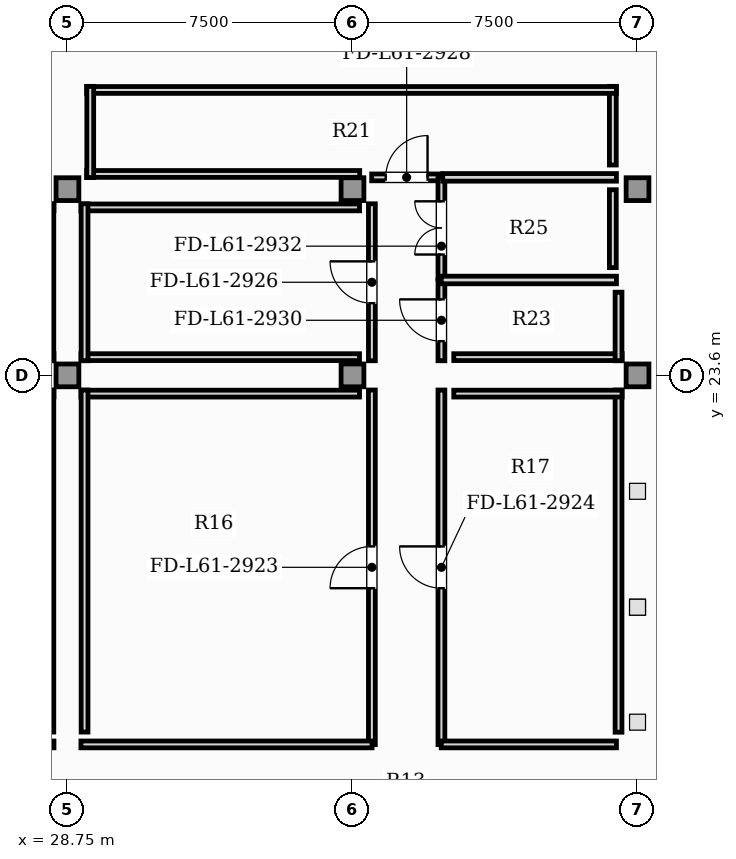
"""IFC4 building model, lengths in metres.
Left out: names, types, materials, properties, quantities, classifications, styles, units other than length and angle.
Written with IfcOpenShell. Run it as: python <this file> out.ifc"""

import sys

from ifc_helpers import new_model, si_unit, direction, frame, frame_2d, origin, origin_2d, place, context, subcontext, project, spatial, rectangle, extrude, element, fill, save


model = new_model("IFC4")
c1 = context("Model", 3, precision=1e-05, world=origin(), true_north=direction((0.0, 1.0)))
c2 = subcontext(c1, "Body", "Model", "MODEL_VIEW")
j1 = project(units=[si_unit("LENGTHUNIT", "METRE"), si_unit("PLANEANGLEUNIT", "RADIAN")], contexts=[c1])
p1 = place(None, origin())
s1 = spatial("IfcSite", under=j1, at=p1, CompositionType="ELEMENT")
p2 = place(p1, origin())
s2 = spatial("IfcBuilding", under=s1, at=p2, CompositionType="ELEMENT")
p3 = place(p2, frame((0.0, 0.0, 246.5)))
s3 = spatial("IfcBuildingStorey", under=s2, at=p3, CompositionType="ELEMENT", Elevation=246.5)
for number, where, z_axis, x_axis in (
    (1, (28.75, 23.6, 0.0), (0.0, 0.0, 1.0), (1.0, 0.0, 0.0)),
    (2, (36.25, 23.6, 0.0), (0.0, 0.0, 1.0), (1.0, 0.0, 0.0)),
    (3, (43.75, 23.6, 0.0), (0.0, 0.0, 1.0), (1.0, 0.0, 0.0)),
    (4, (28.75, 28.5, 0.0), (0.0, 0.0, 1.0), (1.0, 0.0, 0.0)),
    (5, (36.25, 28.5, 0.0), (0.0, 0.0, 1.0), (1.0, 0.0, 0.0)),
    (6, (43.75, 28.5, 0.0), (0.0, 0.0, 1.0), (1.0, 0.0, 0.0)),
):
    element("IfcColumn", number, at=place(p3, frame(where, z_axis=z_axis, x_axis=x_axis)), inside=s3, PredefinedType="COLUMN", context=c2, shape_type="SweptSolid", body=[
        extrude(rectangle(XDim=0.6, YDim=0.6, at=origin_2d()), origin(), (0.0, 0.0, 1.0), 5.2),
    ])
p4 = place(p3, frame((21.605, 13.89, 0.0), z_axis=(0.0, 0.0, 1.0), x_axis=(1.0, 0.0, 0.0)))
e7 = element("IfcWall", 7, at=p4, inside=s3, PredefinedType="PARTITIONING", context=c2, shape_type="SweptSolid", body=[
    extrude(rectangle(XDim=6.79, YDim=0.18, at=frame_2d((3.395, 0.0))), origin(), (0.0, 0.0, 1.0), 4.92),
])
p5 = place(p4, frame((2.845, 0.0, 0.0)))
e8 = element("IfcOpeningElement", 8, at=p5, cuts=e7, PredefinedType="OPENING", context=c2, shape_type="SweptSolid", body=[
    extrude(rectangle(XDim=1.1, YDim=2.2, at=frame_2d((0.55, 1.1))), frame((0.0, 0.1, 0.0), z_axis=(0.0, -1.0, 0.0), x_axis=(1.0, 0.0, 0.0)), (0.0, 0.0, 1.0), 0.2),
])
p6 = place(p3, frame((36.76, 13.885, 0.0), z_axis=(0.0, 0.0, 1.0), x_axis=(0.0, 1.0, 0.0)))
e9 = element("IfcWall", 9, at=p6, inside=s3, PredefinedType="PARTITIONING", context=c2, shape_type="SweptSolid", body=[
    extrude(rectangle(XDim=9.33, YDim=0.18, at=frame_2d((4.665, 0.0))), origin(), (0.0, 0.0, 1.0), 4.92),
])
p7 = place(p6, frame((4.115, 0.0, 0.0)))
e10 = element("IfcOpeningElement", 10, at=p7, cuts=e9, PredefinedType="OPENING", context=c2, shape_type="SweptSolid", body=[
    extrude(rectangle(XDim=1.1, YDim=2.2, at=frame_2d((0.55, 1.1))), frame((0.0, 0.1, 0.0), z_axis=(0.0, -1.0, 0.0), x_axis=(1.0, 0.0, 0.0)), (0.0, 0.0, 1.0), 0.2),
])
p8 = place(p3, frame((29.105, 13.89, 0.0), z_axis=(0.0, 0.0, 1.0), x_axis=(1.0, 0.0, 0.0)))
e11 = element("IfcWall", 11, at=p8, inside=s3, PredefinedType="PARTITIONING", context=c2, shape_type="SweptSolid", body=[
    extrude(rectangle(XDim=7.66, YDim=0.18, at=frame_2d((3.83, 0.0))), origin(), (0.0, 0.0, 1.0), 4.92),
])
p9 = place(p3, frame((38.59, 13.885, 0.0), z_axis=(0.0, 0.0, 1.0), x_axis=(0.0, 1.0, 0.0)))
e12 = element("IfcWall", 12, at=p9, inside=s3, PredefinedType="PARTITIONING", context=c2, shape_type="SweptSolid", body=[
    extrude(rectangle(XDim=9.33, YDim=0.18, at=frame_2d((4.665, 0.0))), origin(), (0.0, 0.0, 1.0), 4.92),
])
p10 = place(p9, frame((4.115, 0.0, 0.0)))
e13 = element("IfcOpeningElement", 13, at=p10, cuts=e12, PredefinedType="OPENING", context=c2, shape_type="SweptSolid", body=[
    extrude(rectangle(XDim=1.1, YDim=2.2, at=frame_2d((0.55, 1.1))), frame((0.0, 0.1, 0.0), z_axis=(0.0, -1.0, 0.0), x_axis=(1.0, 0.0, 0.0)), (0.0, 0.0, 1.0), 0.2),
])
p11 = place(p3, frame((38.585, 13.89, 0.0), z_axis=(0.0, 0.0, 1.0), x_axis=(1.0, 0.0, 0.0)))
e14 = element("IfcWall", 14, at=p11, inside=s3, PredefinedType="PARTITIONING", context=c2, shape_type="SweptSolid", body=[
    extrude(rectangle(XDim=4.61, YDim=0.18, at=frame_2d((2.305, 0.0))), origin(), (0.0, 0.0, 1.0), 4.92),
])
p12 = place(p3, frame((36.76, 23.985, 0.0), z_axis=(0.0, 0.0, 1.0), x_axis=(0.0, 1.0, 0.0)))
e15 = element("IfcWall", 15, at=p12, inside=s3, PredefinedType="PARTITIONING", context=c2, shape_type="SweptSolid", body=[
    extrude(rectangle(XDim=4.13, YDim=0.18, at=frame_2d((2.065, 0.0))), origin(), (0.0, 0.0, 1.0), 4.92),
])
p13 = place(p12, frame((1.515, 0.0, 0.0)))
e16 = element("IfcOpeningElement", 16, at=p13, cuts=e15, PredefinedType="OPENING", context=c2, shape_type="SweptSolid", body=[
    extrude(rectangle(XDim=1.1, YDim=2.2, at=frame_2d((0.55, 1.1))), frame((0.0, 0.1, 0.0), z_axis=(0.0, -1.0, 0.0), x_axis=(1.0, 0.0, 0.0)), (0.0, 0.0, 1.0), 0.2),
])
p14 = place(p3, frame((36.755, 28.81, 0.0), z_axis=(0.0, 0.0, 1.0), x_axis=(1.0, 0.0, 0.0)))
e17 = element("IfcWall", 17, at=p14, inside=s3, PredefinedType="PARTITIONING", context=c2, shape_type="SweptSolid", body=[
    extrude(rectangle(XDim=1.84, YDim=0.18, at=frame_2d((0.92, 0.0))), origin(), (0.0, 0.0, 1.0), 4.92),
])
p15 = place(p14, frame((0.37, 0.0, 0.0)))
e18 = element("IfcOpeningElement", 18, at=p15, cuts=e17, PredefinedType="OPENING", context=c2, shape_type="SweptSolid", body=[
    extrude(rectangle(XDim=1.1, YDim=2.2, at=frame_2d((0.55, 1.1))), frame((0.0, 0.1, 0.0), z_axis=(0.0, -1.0, 0.0), x_axis=(1.0, 0.0, 0.0)), (0.0, 0.0, 1.0), 0.2),
])
p16 = place(p3, frame((38.59, 23.985, 0.0), z_axis=(0.0, 0.0, 1.0), x_axis=(0.0, 1.0, 0.0)))
e19 = element("IfcWall", 19, at=p16, inside=s3, PredefinedType="PARTITIONING", context=c2, shape_type="SweptSolid", body=[
    extrude(rectangle(XDim=2.13, YDim=0.18, at=frame_2d((1.065, 0.0))), origin(), (0.0, 0.0, 1.0), 4.92),
])
p17 = place(p16, frame((0.515, 0.0, 0.0)))
e20 = element("IfcOpeningElement", 20, at=p17, cuts=e19, PredefinedType="OPENING", context=c2, shape_type="SweptSolid", body=[
    extrude(rectangle(XDim=1.1, YDim=2.2, at=frame_2d((0.55, 1.1))), frame((0.0, 0.1, 0.0), z_axis=(0.0, -1.0, 0.0), x_axis=(1.0, 0.0, 0.0)), (0.0, 0.0, 1.0), 0.2),
])
p18 = place(p3, frame((38.59, 26.145, 0.0), z_axis=(0.0, 0.0, 1.0), x_axis=(0.0, 1.0, 0.0)))
e21 = element("IfcWall", 21, at=p18, inside=s3, PredefinedType="PARTITIONING", context=c2, shape_type="SweptSolid", body=[
    extrude(rectangle(XDim=2.67, YDim=0.18, at=frame_2d((1.335, 0.0))), origin(), (0.0, 0.0, 1.0), 4.92),
])
p19 = place(p18, frame((0.635, 0.0, 0.0)))
e22 = element("IfcOpeningElement", 22, at=p19, cuts=e21, PredefinedType="OPENING", context=c2, shape_type="SweptSolid", body=[
    extrude(rectangle(XDim=1.4, YDim=2.2, at=frame_2d((0.7, 1.1))), frame((0.0, 0.1, 0.0), z_axis=(0.0, -1.0, 0.0), x_axis=(1.0, 0.0, 0.0)), (0.0, 0.0, 1.0), 0.2),
])
p20 = place(p3, frame((38.625, 28.81, 0.0), z_axis=(0.0, 0.0, 1.0), x_axis=(1.0, 0.0, 0.0)))
e23 = element("IfcWall", 23, at=p20, inside=s3, PredefinedType="PARTITIONING", context=c2, shape_type="SweptSolid", body=[
    extrude(rectangle(XDim=4.57, YDim=0.2, at=frame_2d((2.285, 0.0))), origin(), (0.0, 0.0, 1.0), 4.92),
])
p21 = place(p3, frame((38.585, 26.11, 0.0), z_axis=(0.0, 0.0, 1.0), x_axis=(1.0, 0.0, 0.0)))
e24 = element("IfcWall", 24, at=p21, inside=s3, PredefinedType="PARTITIONING", context=c2, shape_type="SweptSolid", body=[
    extrude(rectangle(XDim=4.61, YDim=0.2, at=frame_2d((2.305, 0.0))), origin(), (0.0, 0.0, 1.0), 4.92),
])
p22 = place(p3, frame((28.3, 14.215, 0.0), z_axis=(0.0, 0.0, 1.0), x_axis=(0.0, 1.0, 0.0)))
e25 = element("IfcWall", 25, at=p22, inside=s3, PredefinedType="PARTITIONING", context=c2, shape_type="SweptSolid", body=[
    extrude(rectangle(XDim=9.0, YDim=0.18, at=frame_2d((4.5, 0.0))), origin(), (0.0, 0.0, 1.0), 4.92),
])
p23 = place(p3, frame((28.395, 23.12, 0.0), z_axis=(0.0, 0.0, 1.0), x_axis=(-1.0, 0.0, 0.0)))
e26 = element("IfcWall", 26, at=p23, inside=s3, PredefinedType="PARTITIONING", context=c2, shape_type="SweptSolid", body=[
    extrude(rectangle(XDim=6.79, YDim=0.18, at=frame_2d((3.395, 0.0))), origin(), (0.0, 0.0, 1.0), 4.92),
])
p24 = place(p3, frame((36.435, 23.12, 0.0), z_axis=(0.0, 0.0, 1.0), x_axis=(-1.0, 0.0, 0.0)))
e27 = element("IfcWall", 27, at=p24, inside=s3, PredefinedType="PARTITIONING", context=c2, shape_type="SweptSolid", body=[
    extrude(rectangle(XDim=7.33, YDim=0.18, at=frame_2d((3.665, 0.0))), origin(), (0.0, 0.0, 1.0), 4.92),
])
p25 = place(p3, frame((29.2, 23.215, 0.0), z_axis=(0.0, 0.0, 1.0), x_axis=(0.0, -1.0, 0.0)))
e28 = element("IfcWall", 28, at=p25, inside=s3, PredefinedType="PARTITIONING", context=c2, shape_type="SweptSolid", body=[
    extrude(rectangle(XDim=9.0, YDim=0.18, at=frame_2d((4.5, 0.0))), origin(), (0.0, 0.0, 1.0), 4.92),
])
p26 = place(p3, frame((43.25, 14.211, 0.0), z_axis=(0.0, 0.0, 1.0), x_axis=(0.0, 1.0, 0.0)))
e29 = element("IfcWall", 29, at=p26, inside=s3, PredefinedType="PARTITIONING", context=c2, shape_type="SweptSolid", body=[
    extrude(rectangle(XDim=9.004, YDim=0.18, at=frame_2d((4.502, 0.0))), origin(), (0.0, 0.0, 1.0), 4.92),
])
p27 = place(p3, frame((43.345, 23.12, 0.0), z_axis=(0.0, 0.0, 1.0), x_axis=(-1.0, 0.0, 0.0)))
e30 = element("IfcWall", 30, at=p27, inside=s3, PredefinedType="PARTITIONING", context=c2, shape_type="SweptSolid", body=[
    extrude(rectangle(XDim=4.43, YDim=0.18, at=frame_2d((2.215, 0.0))), origin(), (0.0, 0.0, 1.0), 4.92),
])
p28 = place(p3, frame((21.065, 24.08, 0.0), z_axis=(0.0, 0.0, 1.0), x_axis=(1.0, 0.0, 0.0)))
e31 = element("IfcWall", 31, at=p28, inside=s3, PredefinedType="PARTITIONING", context=c2, shape_type="SweptSolid", body=[
    extrude(rectangle(XDim=7.33, YDim=0.18, at=frame_2d((3.665, 0.0))), origin(), (0.0, 0.0, 1.0), 4.92),
])
p29 = place(p3, frame((28.3, 23.985, 0.0), z_axis=(0.0, 0.0, 1.0), x_axis=(0.0, 1.0, 0.0)))
e32 = element("IfcWall", 32, at=p29, inside=s3, PredefinedType="PARTITIONING", context=c2, shape_type="SweptSolid", body=[
    extrude(rectangle(XDim=4.13, YDim=0.18, at=frame_2d((2.065, 0.0))), origin(), (0.0, 0.0, 1.0), 4.92),
])
for number, where, z_axis, x_axis in (
    (33, (28.395, 28.02, 0.0), (0.0, 0.0, 1.0), (-1.0, 0.0, 0.0)),
    (34, (29.105, 24.08, 0.0), (0.0, 0.0, 1.0), (1.0, 0.0, 0.0)),
    (35, (36.435, 28.02, 0.0), (0.0, 0.0, 1.0), (-1.0, 0.0, 0.0)),
):
    element("IfcWall", number, at=place(p3, frame(where, z_axis=z_axis, x_axis=x_axis)), inside=s3, PredefinedType="PARTITIONING", context=c2, shape_type="SweptSolid", body=[
        extrude(rectangle(XDim=7.33, YDim=0.18, at=frame_2d((3.665, 0.0))), origin(), (0.0, 0.0, 1.0), 4.92),
    ])
p30 = place(p3, frame((29.2, 28.115, 0.0), z_axis=(0.0, 0.0, 1.0), x_axis=(0.0, -1.0, 0.0)))
e36 = element("IfcWall", 36, at=p30, inside=s3, PredefinedType="PARTITIONING", context=c2, shape_type="SweptSolid", body=[
    extrude(rectangle(XDim=4.13, YDim=0.18, at=frame_2d((2.065, 0.0))), origin(), (0.0, 0.0, 1.0), 4.92),
])
p31 = place(p3, frame((29.255, 28.9, 0.0), z_axis=(0.0, 0.0, 1.0), x_axis=(1.0, 0.0, 0.0)))
e37 = element("IfcWall", 37, at=p31, inside=s3, PredefinedType="PARTITIONING", context=c2, shape_type="SweptSolid", body=[
    extrude(rectangle(XDim=7.185, YDim=0.18, at=frame_2d((3.593, 0.0))), origin(), (0.0, 0.0, 1.0), 4.92),
])
p32 = place(p3, frame((43.1, 29.135, 0.0), z_axis=(0.0, 0.0, 1.0), x_axis=(0.0, 1.0, 0.0)))
e38 = element("IfcWall", 38, at=p32, inside=s3, PredefinedType="PARTITIONING", context=c2, shape_type="SweptSolid", body=[
    extrude(rectangle(XDim=2.07, YDim=0.18, at=frame_2d((1.035, 0.0))), origin(), (0.0, 0.0, 1.0), 4.92),
])
p33 = place(p3, frame((43.195, 31.11, 0.0), z_axis=(0.0, 0.0, 1.0), x_axis=(-1.0, 0.0, 0.0)))
e39 = element("IfcWall", 39, at=p33, inside=s3, PredefinedType="PARTITIONING", context=c2, shape_type="SweptSolid", body=[
    extrude(rectangle(XDim=13.94, YDim=0.18, at=frame_2d((6.97, 0.0))), origin(), (0.0, 0.0, 1.0), 4.92),
])
p34 = place(p3, frame((29.35, 31.205, 0.0), z_axis=(0.0, 0.0, 1.0), x_axis=(0.0, -1.0, 0.0)))
e40 = element("IfcWall", 40, at=p34, inside=s3, PredefinedType="PARTITIONING", context=c2, shape_type="SweptSolid", body=[
    extrude(rectangle(XDim=2.4, YDim=0.18, at=frame_2d((1.2, 0.0))), origin(), (0.0, 0.0, 1.0), 4.92),
])
p35 = place(p3, frame((38.915, 24.08, 0.0), z_axis=(0.0, 0.0, 1.0), x_axis=(1.0, 0.0, 0.0)))
e41 = element("IfcWall", 41, at=p35, inside=s3, PredefinedType="PARTITIONING", context=c2, shape_type="SweptSolid", body=[
    extrude(rectangle(XDim=4.43, YDim=0.18, at=frame_2d((2.215, 0.0))), origin(), (0.0, 0.0, 1.0), 4.92),
])
p36 = place(p3, frame((43.25, 23.985, 0.0), z_axis=(0.0, 0.0, 1.0), x_axis=(0.0, 1.0, 0.0)))
e42 = element("IfcWall", 42, at=p36, inside=s3, PredefinedType="PARTITIONING", context=c2, shape_type="SweptSolid", body=[
    extrude(rectangle(XDim=1.804, YDim=0.18, at=frame_2d((0.902, 0.0))), origin(), (0.0, 0.0, 1.0), 4.92),
])
p37 = place(p3, frame((43.1, 26.435, 0.0), z_axis=(0.0, 0.0, 1.0), x_axis=(0.0, 1.0, 0.0)))
e43 = element("IfcWall", 43, at=p37, inside=s3, PredefinedType="PARTITIONING", context=c2, shape_type="SweptSolid", body=[
    extrude(rectangle(XDim=2.05, YDim=0.18, at=frame_2d((1.025, 0.0))), origin(), (0.0, 0.0, 1.0), 4.92),
])
p38 = place(p7, origin())
e44 = element("IfcDoor", 44, at=p38, inside=s3, OperationType="SINGLE_SWING_LEFT", PredefinedType="DOOR", context=c2, shape_type="SweptSolid", body=[
    extrude(rectangle(XDim=1.1, YDim=2.2, at=frame_2d((0.55, 1.1))), frame((0.0, 0.025, 0.0), z_axis=(0.0, -1.0, 0.0), x_axis=(1.0, 0.0, 0.0)), (0.0, 0.0, 1.0), 0.05),
])
fill(e10, e44)
p39 = place(p10, origin())
e45 = element("IfcDoor", 45, at=p39, inside=s3, OperationType="SINGLE_SWING_RIGHT", PredefinedType="DOOR", context=c2, shape_type="SweptSolid", body=[
    extrude(rectangle(XDim=1.1, YDim=2.2, at=frame_2d((0.55, 1.1))), frame((0.0, 0.025, 0.0), z_axis=(0.0, -1.0, 0.0), x_axis=(1.0, 0.0, 0.0)), (0.0, 0.0, 1.0), 0.05),
])
fill(e13, e45)
p40 = place(p13, origin())
e46 = element("IfcDoor", 46, at=p40, inside=s3, OperationType="SINGLE_SWING_RIGHT", PredefinedType="DOOR", context=c2, shape_type="SweptSolid", body=[
    extrude(rectangle(XDim=1.1, YDim=2.2, at=frame_2d((0.55, 1.1))), frame((0.0, 0.025, 0.0), z_axis=(0.0, -1.0, 0.0), x_axis=(1.0, 0.0, 0.0)), (0.0, 0.0, 1.0), 0.05),
])
fill(e16, e46)
p41 = place(p15, origin())
e47 = element("IfcDoor", 47, at=p41, inside=s3, OperationType="SINGLE_SWING_RIGHT", PredefinedType="DOOR", context=c2, shape_type="SweptSolid", body=[
    extrude(rectangle(XDim=1.1, YDim=2.2, at=frame_2d((0.55, 1.1))), frame((0.0, 0.025, 0.0), z_axis=(0.0, -1.0, 0.0), x_axis=(1.0, 0.0, 0.0)), (0.0, 0.0, 1.0), 0.05),
])
fill(e18, e47)
p42 = place(p17, origin())
e48 = element("IfcDoor", 48, at=p42, inside=s3, OperationType="SINGLE_SWING_RIGHT", PredefinedType="DOOR", context=c2, shape_type="SweptSolid", body=[
    extrude(rectangle(XDim=1.1, YDim=2.2, at=frame_2d((0.55, 1.1))), frame((0.0, 0.025, 0.0), z_axis=(0.0, -1.0, 0.0), x_axis=(1.0, 0.0, 0.0)), (0.0, 0.0, 1.0), 0.05),
])
fill(e20, e48)
p43 = place(p19, origin())
e49 = element("IfcDoor", 49, at=p43, inside=s3, OperationType="DOUBLE_DOOR_SINGLE_SWING", PredefinedType="DOOR", context=c2, shape_type="SweptSolid", body=[
    extrude(rectangle(XDim=1.4, YDim=2.2, at=frame_2d((0.7, 1.1))), frame((0.0, 0.025, 0.0), z_axis=(0.0, -1.0, 0.0), x_axis=(1.0, 0.0, 0.0)), (0.0, 0.0, 1.0), 0.05),
])
fill(e22, e49)
save(model, sys.argv[1])
